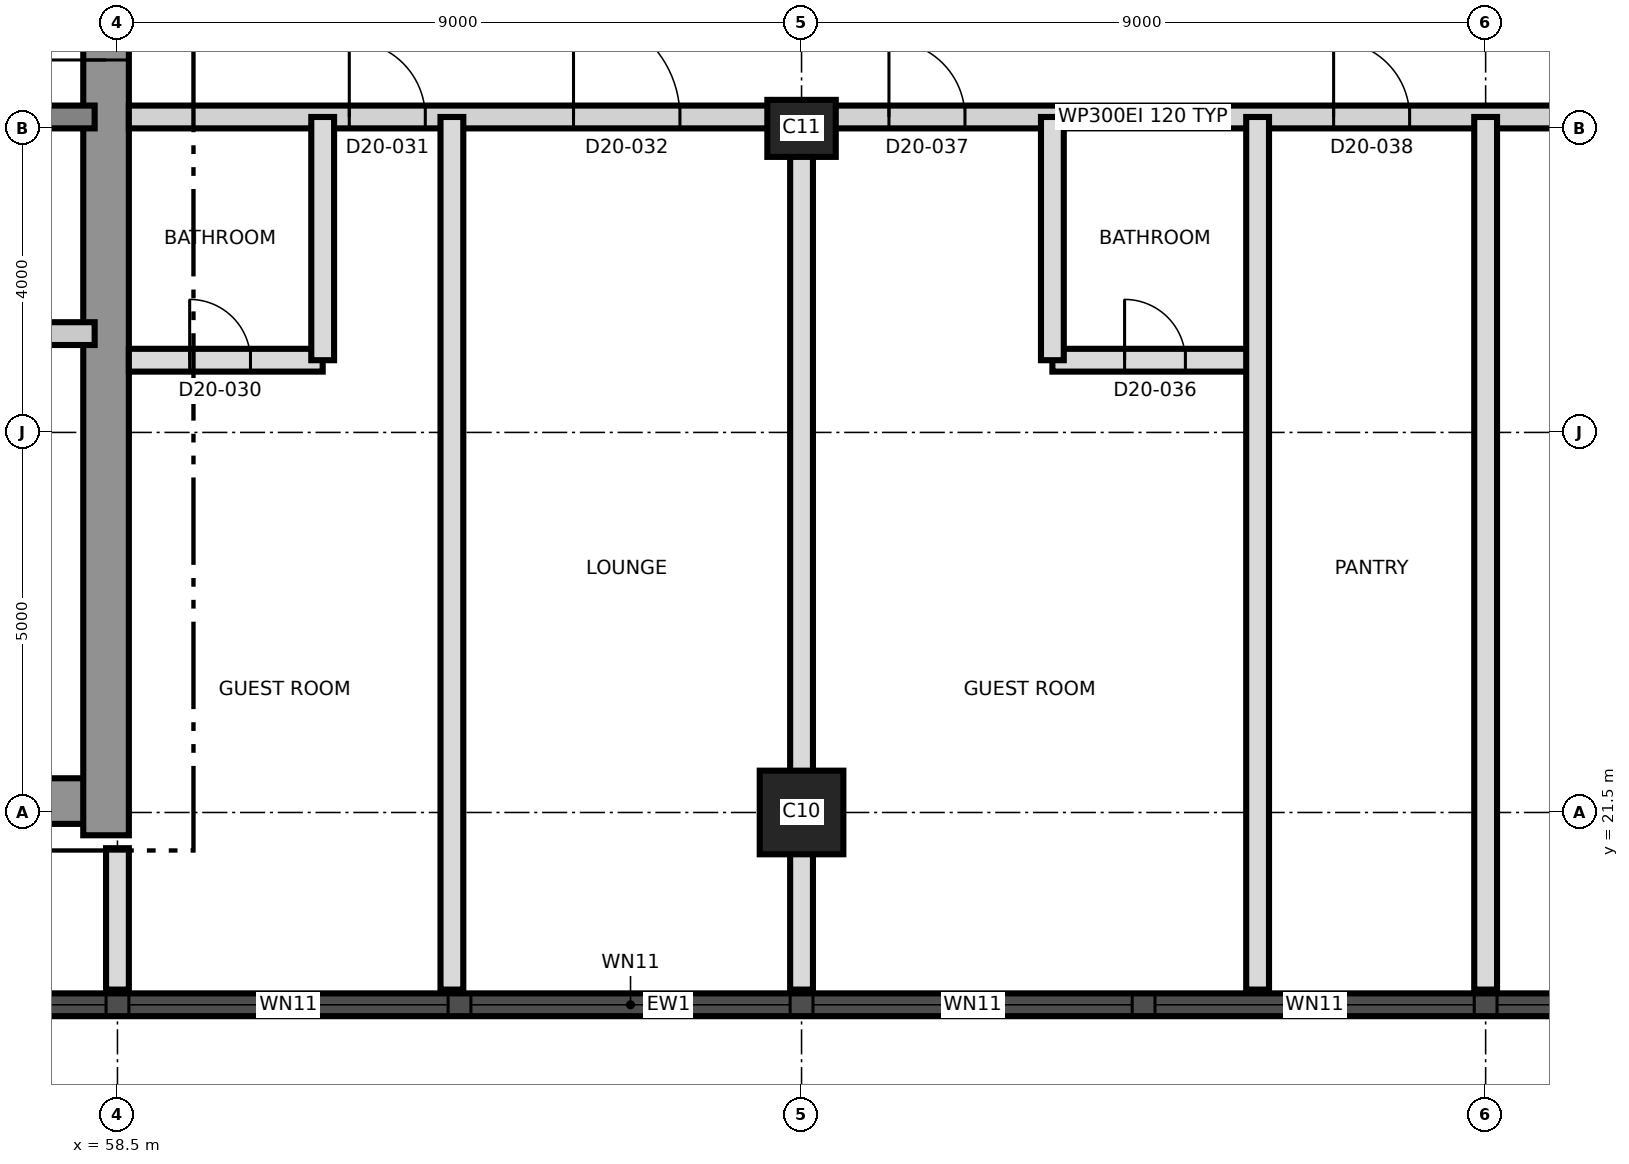
"""IFC4 building model, lengths in metres.
Left out: names, types, materials, properties, quantities, classifications, styles, units other than length and angle.
Written with IfcOpenShell. Run it as: python <this file> out.ifc"""

import sys

from ifc_helpers import new_model, si_unit, direction, frame, frame_2d, origin, origin_2d, place, context, subcontext, project, spatial, rectangle, extrude, element, fill, save


model = new_model("IFC4")
c1 = context("Model", 3, precision=1e-05, world=origin(), true_north=direction((0.0, 1.0)))
c2 = subcontext(c1, "Body", "Model", "MODEL_VIEW")
j1 = project(units=[si_unit("LENGTHUNIT", "METRE"), si_unit("PLANEANGLEUNIT", "RADIAN")], contexts=[c1])
p1 = place(None, origin())
s1 = spatial("IfcSite", under=j1, at=p1, CompositionType="ELEMENT")
p2 = place(p1, origin())
s2 = spatial("IfcBuilding", under=s1, at=p2, CompositionType="ELEMENT")
p3 = place(p2, frame((0.0, 0.0, 186.6)))
s3 = spatial("IfcBuildingStorey", under=s2, at=p3, CompositionType="ELEMENT", Elevation=186.6)
p4 = place(p3, frame((31.2, 21.65, 0.0), z_axis=(0.0, 0.0, 1.0), x_axis=(1.0, 0.0, 0.0)))
e1 = element("IfcWall", 1, at=p4, inside=s3, PredefinedType="SHEAR", context=c2, shape_type="SweptSolid", body=[
    extrude(rectangle(XDim=27.0, YDim=0.6, at=frame_2d((13.5, 0.0))), origin(), (0.0, 0.0, 1.0), 3.7),
])
p5 = place(p3, frame((58.35, 21.2, 0.0), z_axis=(0.0, 0.0, 1.0), x_axis=(0.0, 1.0, 0.0)))
e2 = element("IfcWall", 2, at=p5, inside=s3, PredefinedType="SHEAR", context=c2, shape_type="SweptSolid", body=[
    extrude(rectangle(XDim=18.6, YDim=0.6, at=frame_2d((9.3, 0.0))), origin(), (0.0, 0.0, 1.0), 3.7),
])
p6 = place(p5, frame((10.2, 0.0, 0.0)))
e3 = element("IfcOpeningElement", 3, at=p6, cuts=e2, PredefinedType="OPENING", context=c2, shape_type="SweptSolid", body=[
    extrude(rectangle(XDim=1.2, YDim=2.1, at=frame_2d((0.6, 1.05))), frame((0.0, 0.31, 0.0), z_axis=(0.0, -1.0, 0.0), x_axis=(1.0, 0.0, 0.0)), (0.0, 0.0, 1.0), 0.62),
])
p7 = place(p3, frame((31.8, 30.65, 0.0), z_axis=(0.0, 0.0, 1.0), x_axis=(1.0, 0.0, 0.0)))
e4 = element("IfcWall", 4, at=p7, inside=s3, PredefinedType="SHEAR", context=c2, shape_type="SweptSolid", body=[
    extrude(rectangle(XDim=26.4, YDim=0.3, at=frame_2d((13.2, 0.0))), origin(), (0.0, 0.0, 1.0), 3.7),
])
p8 = place(p7, frame((24.7, 0.0, 0.0)))
e5 = element("IfcOpeningElement", 5, at=p8, cuts=e4, PredefinedType="OPENING", context=c2, shape_type="SweptSolid", body=[
    extrude(rectangle(XDim=1.0, YDim=2.1, at=frame_2d((0.5, 1.05))), frame((0.0, 0.16, 0.0), z_axis=(0.0, -1.0, 0.0), x_axis=(1.0, 0.0, 0.0)), (0.0, 0.0, 1.0), 0.32),
])
p9 = place(p7, frame((4.0, 0.0, 0.0)))
e6 = element("IfcOpeningElement", 6, at=p9, cuts=e4, PredefinedType="OPENING", context=c2, shape_type="SweptSolid", body=[
    extrude(rectangle(XDim=1.0, YDim=2.1, at=frame_2d((0.5, 1.05))), frame((0.0, 0.16, 0.0), z_axis=(0.0, -1.0, 0.0), x_axis=(1.0, 0.0, 0.0)), (0.0, 0.0, 1.0), 0.32),
])
p10 = place(p3, frame((67.5, 21.5, 0.0), z_axis=(0.0, 0.0, 1.0), x_axis=(1.0, 0.0, 0.0)))
e7 = element("IfcColumn", 7, at=p10, inside=s3, PredefinedType="COLUMN", context=c2, shape_type="SweptSolid", body=[
    extrude(rectangle(XDim=1.1, YDim=1.1, at=origin_2d()), origin(), (0.0, 0.0, 1.0), 3.7),
])
p11 = place(p3, frame((67.5, 30.5, 0.0), z_axis=(0.0, 0.0, 1.0), x_axis=(1.0, 0.0, 0.0)))
e8 = element("IfcColumn", 8, at=p11, inside=s3, PredefinedType="COLUMN", context=c2, shape_type="SweptSolid", body=[
    extrude(rectangle(XDim=0.9, YDim=0.75, at=origin_2d()), origin(), (0.0, 0.0, 1.0), 3.7),
])
p12 = place(p3, frame((44.01, 18.97, 0.0), z_axis=(0.0, 0.0, 1.0), x_axis=(1.0, 0.0, 0.0)))
e9 = element("IfcWall", 9, at=p12, inside=s3, PredefinedType="SOLIDWALL", context=c2, shape_type="SweptSolid", body=[
    extrude(rectangle(XDim=43.478, YDim=0.3, at=frame_2d((21.739, 0.0))), origin(), (0.0, 0.0, 1.0), 3.4),
])
p13 = place(p12, frame((1.845, 0.0, 0.3)))
e10 = element("IfcOpeningElement", 10, at=p13, cuts=e9, PredefinedType="OPENING", context=c2, shape_type="SweptSolid", body=[
    extrude(rectangle(XDim=1.8, YDim=2.4, at=frame_2d((0.9, 1.2))), frame((0.0, 0.16, 0.0), z_axis=(0.0, -1.0, 0.0), x_axis=(1.0, 0.0, 0.0)), (0.0, 0.0, 1.0), 0.32),
])
p14 = place(p12, frame((5.64, 0.0, 0.9)))
e11 = element("IfcOpeningElement", 11, at=p14, cuts=e9, PredefinedType="OPENING", context=c2, shape_type="SweptSolid", body=[
    extrude(rectangle(XDim=4.2, YDim=1.5, at=frame_2d((2.1, 0.75))), frame((0.0, 0.16, 0.0), z_axis=(0.0, -1.0, 0.0), x_axis=(1.0, 0.0, 0.0)), (0.0, 0.0, 1.0), 0.32),
])
p15 = place(p12, frame((10.14, 0.0, 0.9)))
e12 = element("IfcOpeningElement", 12, at=p15, cuts=e9, PredefinedType="OPENING", context=c2, shape_type="SweptSolid", body=[
    extrude(rectangle(XDim=4.2, YDim=1.5, at=frame_2d((2.1, 0.75))), frame((0.0, 0.16, 0.0), z_axis=(0.0, -1.0, 0.0), x_axis=(1.0, 0.0, 0.0)), (0.0, 0.0, 1.0), 0.32),
])
p16 = place(p12, frame((14.64, 0.0, 0.9)))
e13 = element("IfcOpeningElement", 13, at=p16, cuts=e9, PredefinedType="OPENING", context=c2, shape_type="SweptSolid", body=[
    extrude(rectangle(XDim=4.2, YDim=1.5, at=frame_2d((2.1, 0.75))), frame((0.0, 0.16, 0.0), z_axis=(0.0, -1.0, 0.0), x_axis=(1.0, 0.0, 0.0)), (0.0, 0.0, 1.0), 0.32),
])
p17 = place(p12, frame((19.14, 0.0, 0.9)))
e14 = element("IfcOpeningElement", 14, at=p17, cuts=e9, PredefinedType="OPENING", context=c2, shape_type="SweptSolid", body=[
    extrude(rectangle(XDim=4.2, YDim=1.5, at=frame_2d((2.1, 0.75))), frame((0.0, 0.16, 0.0), z_axis=(0.0, -1.0, 0.0), x_axis=(1.0, 0.0, 0.0)), (0.0, 0.0, 1.0), 0.32),
])
p18 = place(p12, frame((23.64, 0.0, 0.9)))
e15 = element("IfcOpeningElement", 15, at=p18, cuts=e9, PredefinedType="OPENING", context=c2, shape_type="SweptSolid", body=[
    extrude(rectangle(XDim=4.2, YDim=1.5, at=frame_2d((2.1, 0.75))), frame((0.0, 0.16, 0.0), z_axis=(0.0, -1.0, 0.0), x_axis=(1.0, 0.0, 0.0)), (0.0, 0.0, 1.0), 0.32),
])
p19 = place(p12, frame((28.14, 0.0, 0.9)))
e16 = element("IfcOpeningElement", 16, at=p19, cuts=e9, PredefinedType="OPENING", context=c2, shape_type="SweptSolid", body=[
    extrude(rectangle(XDim=4.2, YDim=1.5, at=frame_2d((2.1, 0.75))), frame((0.0, 0.16, 0.0), z_axis=(0.0, -1.0, 0.0), x_axis=(1.0, 0.0, 0.0)), (0.0, 0.0, 1.0), 0.32),
])
p20 = place(p12, frame((32.64, 0.0, 0.9)))
e17 = element("IfcOpeningElement", 17, at=p20, cuts=e9, PredefinedType="OPENING", context=c2, shape_type="SweptSolid", body=[
    extrude(rectangle(XDim=4.2, YDim=1.5, at=frame_2d((2.1, 0.75))), frame((0.0, 0.16, 0.0), z_axis=(0.0, -1.0, 0.0), x_axis=(1.0, 0.0, 0.0)), (0.0, 0.0, 1.0), 0.32),
])
p21 = place(p12, frame((37.14, 0.0, 0.9)))
e18 = element("IfcOpeningElement", 18, at=p21, cuts=e9, PredefinedType="OPENING", context=c2, shape_type="SweptSolid", body=[
    extrude(rectangle(XDim=4.2, YDim=1.5, at=frame_2d((2.1, 0.75))), frame((0.0, 0.16, 0.0), z_axis=(0.0, -1.0, 0.0), x_axis=(1.0, 0.0, 0.0)), (0.0, 0.0, 1.0), 0.32),
])
p22 = place(p3, frame((55.8, 27.8, 0.0), z_axis=(0.0, 0.0, 1.0), x_axis=(1.0, 0.0, 0.0)))
e19 = element("IfcWall", 19, at=p22, inside=s3, PredefinedType="PARTITIONING", context=c2, shape_type="SweptSolid", body=[
    extrude(rectangle(XDim=2.4, YDim=0.3, at=frame_2d((1.2, 0.0))), origin(), (0.0, 0.0, 1.0), 3.4),
])
p23 = place(p22, frame((0.75, 0.0, 0.0)))
e20 = element("IfcOpeningElement", 20, at=p23, cuts=e19, PredefinedType="OPENING", context=c2, shape_type="SweptSolid", body=[
    extrude(rectangle(XDim=0.9, YDim=2.1, at=frame_2d((0.45, 1.05))), frame((0.0, 0.16, 0.0), z_axis=(0.0, -1.0, 0.0), x_axis=(1.0, 0.0, 0.0)), (0.0, 0.0, 1.0), 0.32),
])
p24 = place(p3, frame((58.65, 27.45, 0.0), z_axis=(0.0, 0.0, 1.0), x_axis=(1.0, 0.0, 0.0)))
e21 = element("IfcWall", 21, at=p24, inside=s3, PredefinedType="PARTITIONING", context=c2, shape_type="SweptSolid", body=[
    extrude(rectangle(XDim=2.55, YDim=0.3, at=frame_2d((1.275, 0.0))), origin(), (0.0, 0.0, 1.0), 3.4),
])
p25 = place(p24, frame((0.8, 0.0, 0.0)))
e22 = element("IfcOpeningElement", 22, at=p25, cuts=e21, PredefinedType="OPENING", context=c2, shape_type="SweptSolid", body=[
    extrude(rectangle(XDim=0.8, YDim=2.1, at=frame_2d((0.4, 1.05))), frame((0.0, 0.16, 0.0), z_axis=(0.0, -1.0, 0.0), x_axis=(1.0, 0.0, 0.0)), (0.0, 0.0, 1.0), 0.32),
])
p26 = place(p3, frame((70.8, 27.45, 0.0), z_axis=(0.0, 0.0, 1.0), x_axis=(1.0, 0.0, 0.0)))
e23 = element("IfcWall", 23, at=p26, inside=s3, PredefinedType="PARTITIONING", context=c2, shape_type="SweptSolid", body=[
    extrude(rectangle(XDim=2.7, YDim=0.3, at=frame_2d((1.35, 0.0))), origin(), (0.0, 0.0, 1.0), 3.4),
])
p27 = place(p26, frame((0.95, 0.0, 0.0)))
e24 = element("IfcOpeningElement", 24, at=p27, cuts=e23, PredefinedType="OPENING", context=c2, shape_type="SweptSolid", body=[
    extrude(rectangle(XDim=0.8, YDim=2.1, at=frame_2d((0.4, 1.05))), frame((0.0, 0.16, 0.0), z_axis=(0.0, -1.0, 0.0), x_axis=(1.0, 0.0, 0.0)), (0.0, 0.0, 1.0), 0.32),
])
p28 = place(p3, frame((58.65, 30.65, 0.0), z_axis=(0.0, 0.0, 1.0), x_axis=(1.0, 0.0, 0.0)))
e25 = element("IfcWall", 25, at=p28, inside=s3, PredefinedType="PARTITIONING", context=c2, shape_type="SweptSolid", body=[
    extrude(rectangle(XDim=26.68, YDim=0.3, at=frame_2d((13.34, 0.0))), origin(), (0.0, 0.0, 1.0), 3.4),
])
p29 = place(p28, frame((2.9, 0.0, 0.0)))
e26 = element("IfcOpeningElement", 26, at=p29, cuts=e25, PredefinedType="OPENING", context=c2, shape_type="SweptSolid", body=[
    extrude(rectangle(XDim=1.0, YDim=2.1, at=frame_2d((0.5, 1.05))), frame((0.0, 0.16, 0.0), z_axis=(0.0, -1.0, 0.0), x_axis=(1.0, 0.0, 0.0)), (0.0, 0.0, 1.0), 0.32),
])
p30 = place(p28, frame((5.85, 0.0, 0.0)))
e27 = element("IfcOpeningElement", 27, at=p30, cuts=e25, PredefinedType="OPENING", context=c2, shape_type="SweptSolid", body=[
    extrude(rectangle(XDim=1.4, YDim=2.1, at=frame_2d((0.7, 1.05))), frame((0.0, 0.16, 0.0), z_axis=(0.0, -1.0, 0.0), x_axis=(1.0, 0.0, 0.0)), (0.0, 0.0, 1.0), 0.32),
])
p31 = place(p28, frame((10.0, 0.0, 0.0)))
e28 = element("IfcOpeningElement", 28, at=p31, cuts=e25, PredefinedType="OPENING", context=c2, shape_type="SweptSolid", body=[
    extrude(rectangle(XDim=1.0, YDim=2.1, at=frame_2d((0.5, 1.05))), frame((0.0, 0.16, 0.0), z_axis=(0.0, -1.0, 0.0), x_axis=(1.0, 0.0, 0.0)), (0.0, 0.0, 1.0), 0.32),
])
p32 = place(p28, frame((15.85, 0.0, 0.0)))
e29 = element("IfcOpeningElement", 29, at=p32, cuts=e25, PredefinedType="OPENING", context=c2, shape_type="SweptSolid", body=[
    extrude(rectangle(XDim=1.0, YDim=2.1, at=frame_2d((0.5, 1.05))), frame((0.0, 0.16, 0.0), z_axis=(0.0, -1.0, 0.0), x_axis=(1.0, 0.0, 0.0)), (0.0, 0.0, 1.0), 0.32),
])
p33 = place(p28, frame((20.2, 0.0, 0.0)))
e30 = element("IfcOpeningElement", 30, at=p33, cuts=e25, PredefinedType="OPENING", context=c2, shape_type="SweptSolid", body=[
    extrude(rectangle(XDim=1.0, YDim=2.1, at=frame_2d((0.5, 1.05))), frame((0.0, 0.16, 0.0), z_axis=(0.0, -1.0, 0.0), x_axis=(1.0, 0.0, 0.0)), (0.0, 0.0, 1.0), 0.32),
])
p34 = place(p3, frame((58.5, 19.17, 0.0), z_axis=(0.0, 0.0, 1.0), x_axis=(0.0, 1.0, 0.0)))
e31 = element("IfcWall", 31, at=p34, inside=s3, PredefinedType="PARTITIONING", context=c2, shape_type="SweptSolid", body=[
    extrude(rectangle(XDim=1.86, YDim=0.3, at=frame_2d((0.93, 0.0))), origin(), (0.0, 0.0, 1.0), 3.35),
])
p35 = place(p3, frame((61.2, 27.45, 0.0), z_axis=(0.0, 0.0, 1.0), x_axis=(0.0, 1.0, 0.0)))
e32 = element("IfcWall", 32, at=p35, inside=s3, PredefinedType="PARTITIONING", context=c2, shape_type="SweptSolid", body=[
    extrude(rectangle(XDim=3.2, YDim=0.3, at=frame_2d((1.6, 0.0))), origin(), (0.0, 0.0, 1.0), 3.4),
])
for number, where, z_axis, x_axis in (
    (33, (62.9, 19.17, 0.0), (0.0, 0.0, 1.0), (0.0, 1.0, 0.0)),
    (34, (67.5, 19.17, 0.0), (0.0, 0.0, 1.0), (0.0, 1.0, 0.0)),
):
    element("IfcWall", number, at=place(p3, frame(where, z_axis=z_axis, x_axis=x_axis)), inside=s3, PredefinedType="PARTITIONING", context=c2, shape_type="SweptSolid", body=[
        extrude(rectangle(XDim=11.48, YDim=0.3, at=frame_2d((5.74, 0.0))), origin(), (0.0, 0.0, 1.0), 3.35),
    ])
p36 = place(p3, frame((70.8, 27.45, 0.0), z_axis=(0.0, 0.0, 1.0), x_axis=(0.0, 1.0, 0.0)))
e35 = element("IfcWall", 35, at=p36, inside=s3, PredefinedType="PARTITIONING", context=c2, shape_type="SweptSolid", body=[
    extrude(rectangle(XDim=3.2, YDim=0.3, at=frame_2d((1.6, 0.0))), origin(), (0.0, 0.0, 1.0), 3.4),
])
for number, where, z_axis, x_axis in (
    (36, (73.5, 19.17, 0.0), (0.0, 0.0, 1.0), (0.0, 1.0, 0.0)),
    (37, (76.5, 19.17, 0.0), (0.0, 0.0, 1.0), (0.0, 1.0, 0.0)),
):
    element("IfcWall", number, at=place(p3, frame(where, z_axis=z_axis, x_axis=x_axis)), inside=s3, PredefinedType="PARTITIONING", context=c2, shape_type="SweptSolid", body=[
        extrude(rectangle(XDim=11.48, YDim=0.3, at=frame_2d((5.74, 0.0))), origin(), (0.0, 0.0, 1.0), 3.35),
    ])
p37 = place(p15, origin())
e38 = element("IfcWindow", 38, at=p37, inside=s3, PartitioningType="SINGLE_PANEL", PredefinedType="WINDOW", context=c2, shape_type="SweptSolid", body=[
    extrude(rectangle(XDim=4.2, YDim=1.5, at=frame_2d((2.1, 0.75))), frame((0.0, 0.03, 0.0), z_axis=(0.0, -1.0, 0.0), x_axis=(1.0, 0.0, 0.0)), (0.0, 0.0, 1.0), 0.06),
])
fill(e12, e38)
p38 = place(p16, origin())
e39 = element("IfcWindow", 39, at=p38, inside=s3, PartitioningType="SINGLE_PANEL", PredefinedType="WINDOW", context=c2, shape_type="SweptSolid", body=[
    extrude(rectangle(XDim=4.2, YDim=1.5, at=frame_2d((2.1, 0.75))), frame((0.0, 0.03, 0.0), z_axis=(0.0, -1.0, 0.0), x_axis=(1.0, 0.0, 0.0)), (0.0, 0.0, 1.0), 0.06),
])
fill(e13, e39)
p39 = place(p17, origin())
e40 = element("IfcWindow", 40, at=p39, inside=s3, PartitioningType="SINGLE_PANEL", PredefinedType="WINDOW", context=c2, shape_type="SweptSolid", body=[
    extrude(rectangle(XDim=4.2, YDim=1.5, at=frame_2d((2.1, 0.75))), frame((0.0, 0.03, 0.0), z_axis=(0.0, -1.0, 0.0), x_axis=(1.0, 0.0, 0.0)), (0.0, 0.0, 1.0), 0.06),
])
fill(e14, e40)
p40 = place(p18, origin())
e41 = element("IfcWindow", 41, at=p40, inside=s3, PartitioningType="SINGLE_PANEL", PredefinedType="WINDOW", context=c2, shape_type="SweptSolid", body=[
    extrude(rectangle(XDim=4.2, YDim=1.5, at=frame_2d((2.1, 0.75))), frame((0.0, 0.03, 0.0), z_axis=(0.0, -1.0, 0.0), x_axis=(1.0, 0.0, 0.0)), (0.0, 0.0, 1.0), 0.06),
])
fill(e15, e41)
p41 = place(p19, origin())
e42 = element("IfcWindow", 42, at=p41, inside=s3, PartitioningType="SINGLE_PANEL", PredefinedType="WINDOW", context=c2, shape_type="SweptSolid", body=[
    extrude(rectangle(XDim=4.2, YDim=1.5, at=frame_2d((2.1, 0.75))), frame((0.0, 0.03, 0.0), z_axis=(0.0, -1.0, 0.0), x_axis=(1.0, 0.0, 0.0)), (0.0, 0.0, 1.0), 0.06),
])
fill(e16, e42)
p42 = place(p20, origin())
e43 = element("IfcWindow", 43, at=p42, inside=s3, PartitioningType="SINGLE_PANEL", PredefinedType="WINDOW", context=c2, shape_type="SweptSolid", body=[
    extrude(rectangle(XDim=4.2, YDim=1.5, at=frame_2d((2.1, 0.75))), frame((0.0, 0.03, 0.0), z_axis=(0.0, -1.0, 0.0), x_axis=(1.0, 0.0, 0.0)), (0.0, 0.0, 1.0), 0.06),
])
fill(e17, e43)
p43 = place(p6, origin())
e44 = element("IfcDoor", 44, at=p43, inside=s3, OperationType="SINGLE_SWING_LEFT", PredefinedType="DOOR", context=c2, shape_type="SweptSolid", body=[
    extrude(rectangle(XDim=1.2, YDim=2.1, at=frame_2d((0.6, 1.05))), frame((0.0, 0.025, 0.0), z_axis=(0.0, -1.0, 0.0), x_axis=(1.0, 0.0, 0.0)), (0.0, 0.0, 1.0), 0.05),
])
fill(e3, e44)
p44 = place(p25, origin())
e45 = element("IfcDoor", 45, at=p44, inside=s3, OperationType="SINGLE_SWING_LEFT", PredefinedType="DOOR", context=c2, shape_type="SweptSolid", body=[
    extrude(rectangle(XDim=0.8, YDim=2.1, at=frame_2d((0.4, 1.05))), frame((0.0, 0.025, 0.0), z_axis=(0.0, -1.0, 0.0), x_axis=(1.0, 0.0, 0.0)), (0.0, 0.0, 1.0), 0.05),
])
fill(e22, e45)
p45 = place(p29, origin())
e46 = element("IfcDoor", 46, at=p45, inside=s3, OperationType="SINGLE_SWING_LEFT", PredefinedType="DOOR", context=c2, shape_type="SweptSolid", body=[
    extrude(rectangle(XDim=1.0, YDim=2.1, at=frame_2d((0.5, 1.05))), frame((0.0, 0.025, 0.0), z_axis=(0.0, -1.0, 0.0), x_axis=(1.0, 0.0, 0.0)), (0.0, 0.0, 1.0), 0.05),
])
fill(e26, e46)
p46 = place(p30, origin())
e47 = element("IfcDoor", 47, at=p46, inside=s3, OperationType="SINGLE_SWING_RIGHT", PredefinedType="DOOR", context=c2, shape_type="SweptSolid", body=[
    extrude(rectangle(XDim=1.4, YDim=2.1, at=frame_2d((0.7, 1.05))), frame((0.0, 0.025, 0.0), z_axis=(0.0, -1.0, 0.0), x_axis=(1.0, 0.0, 0.0)), (0.0, 0.0, 1.0), 0.05),
])
fill(e27, e47)
p47 = place(p27, origin())
e48 = element("IfcDoor", 48, at=p47, inside=s3, OperationType="SINGLE_SWING_LEFT", PredefinedType="DOOR", context=c2, shape_type="SweptSolid", body=[
    extrude(rectangle(XDim=0.8, YDim=2.1, at=frame_2d((0.4, 1.05))), frame((0.0, 0.025, 0.0), z_axis=(0.0, -1.0, 0.0), x_axis=(1.0, 0.0, 0.0)), (0.0, 0.0, 1.0), 0.05),
])
fill(e24, e48)
p48 = place(p31, origin())
e49 = element("IfcDoor", 49, at=p48, inside=s3, OperationType="SINGLE_SWING_LEFT", PredefinedType="DOOR", context=c2, shape_type="SweptSolid", body=[
    extrude(rectangle(XDim=1.0, YDim=2.1, at=frame_2d((0.5, 1.05))), frame((0.0, 0.025, 0.0), z_axis=(0.0, -1.0, 0.0), x_axis=(1.0, 0.0, 0.0)), (0.0, 0.0, 1.0), 0.05),
])
fill(e28, e49)
p49 = place(p32, origin())
e50 = element("IfcDoor", 50, at=p49, inside=s3, OperationType="SINGLE_SWING_RIGHT", PredefinedType="DOOR", context=c2, shape_type="SweptSolid", body=[
    extrude(rectangle(XDim=1.0, YDim=2.1, at=frame_2d((0.5, 1.05))), frame((0.0, 0.025, 0.0), z_axis=(0.0, -1.0, 0.0), x_axis=(1.0, 0.0, 0.0)), (0.0, 0.0, 1.0), 0.05),
])
fill(e29, e50)
save(model, sys.argv[1])
